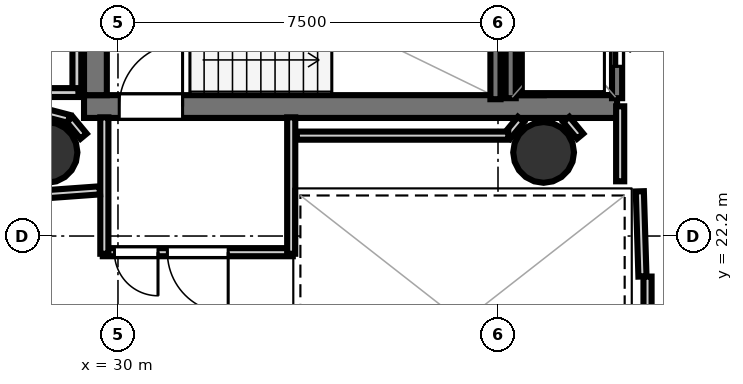
"""IFC4 building model, lengths in metres.
Left out: names, types, materials, properties, quantities, classifications, styles, units other than length and angle.
Written with IfcOpenShell. Run it as: python <this file> out.ifc"""

import sys

from ifc_helpers import new_model, si_unit, direction, frame, frame_2d, origin, origin_2d, place, context, subcontext, project, spatial, rectangle, hollow_circle, extrude, element, fill, save


model = new_model("IFC4")
c1 = context("Model", 3, precision=1e-05, world=origin(), true_north=direction((0.0, 1.0)))
c2 = subcontext(c1, "Body", "Model", "MODEL_VIEW")
j1 = project(units=[si_unit("LENGTHUNIT", "METRE"), si_unit("PLANEANGLEUNIT", "RADIAN")], contexts=[c1])
p1 = place(None, origin())
s1 = spatial("IfcSite", under=j1, at=p1, CompositionType="ELEMENT")
p2 = place(p1, origin())
s2 = spatial("IfcBuilding", under=s1, at=p2, CompositionType="ELEMENT")
p3 = place(p2, frame((0.0, 0.0, 211.4)))
s3 = spatial("IfcBuildingStorey", under=s2, at=p3, CompositionType="ELEMENT", Elevation=211.4)
p4 = place(p3, frame((29.33, 24.755, 0.0), z_axis=(0.0, 0.0, 1.0), x_axis=(1.0, 0.0, 0.0)))
e1 = element("IfcWall", 1, at=p4, inside=s3, PredefinedType="SHEAR", context=c2, shape_type="SweptSolid", body=[
    extrude(rectangle(XDim=10.52, YDim=0.45, at=frame_2d((5.26, 0.0))), origin(), (0.0, 0.0, 1.0), 3.52),
])
p5 = place(p4, frame((0.695, 0.0, 0.0)))
e2 = element("IfcOpeningElement", 2, at=p5, cuts=e1, PredefinedType="OPENING", context=c2, shape_type="SweptSolid", body=[
    extrude(rectangle(XDim=1.25, YDim=2.15, at=frame_2d((0.625, 1.075))), frame((0.0, 0.235, 0.0), z_axis=(0.0, -1.0, 0.0), x_axis=(1.0, 0.0, 0.0)), (0.0, 0.0, 1.0), 0.47),
])
for number, where, z_axis, x_axis in (
    (3, (29.555, 24.98, 0.0), (0.0, 0.0, 1.0), (0.0, 1.0, 0.0)),
    (4, (38.18, 24.98, 0.0), (0.0, 0.0, 1.0), (0.0, 1.0, 0.0)),
):
    element("IfcWall", number, at=place(p3, frame(where, z_axis=z_axis, x_axis=x_axis)), inside=s3, PredefinedType="SHEAR", context=c2, shape_type="SweptSolid", body=[
        extrude(rectangle(XDim=7.44, YDim=0.45, at=frame_2d((3.72, 0.0))), origin(), (0.0, 0.0, 1.0), 3.52),
    ])
for number, where, z_axis, x_axis in (
    (5, (28.6, 23.85, 0.0), (0.0, 0.0, 1.0), (1.0, 0.0, 0.0)),
    (6, (38.4, 23.85, 0.0), (0.0, 0.0, 1.0), (1.0, 0.0, 0.0)),
):
    element("IfcColumn", number, at=place(p3, frame(where, z_axis=z_axis, x_axis=x_axis)), inside=s3, PredefinedType="COLUMN", context=c2, shape_type="SweptSolid", body=[
        extrude(hollow_circle(Radius=0.6, WallThickness=0.03, at=origin_2d()), origin(), (0.0, 0.0, 1.0), 3.7),
    ])
p6 = place(p3, frame((37.45, 24.9, 0.0), z_axis=(0.0, 0.0, 1.0), x_axis=(0.0, 1.0, 0.0)))
e7 = element("IfcWall", 7, at=p6, inside=s3, PredefinedType="SOLIDWALL", context=c2, shape_type="SweptSolid", body=[
    extrude(rectangle(XDim=3.06, YDim=0.2, at=frame_2d((1.53, 0.0))), origin(), (0.0, 0.0, 1.0), 3.52),
])
p7 = place(p3, frame((39.85, 24.92, 0.0), z_axis=(0.0, 0.0, 1.0), x_axis=(0.0, 1.0, 0.0)))
e8 = element("IfcWall", 8, at=p7, inside=s3, PredefinedType="SOLIDWALL", context=c2, shape_type="SweptSolid", body=[
    extrude(rectangle(XDim=2.36, YDim=0.2, at=frame_2d((1.18, 0.0))), origin(), (0.0, 0.0, 1.0), 3.52),
])
p8 = place(p7, frame((0.63, 0.0, 0.0)))
e9 = element("IfcOpeningElement", 9, at=p8, cuts=e8, PredefinedType="OPENING", context=c2, shape_type="SweptSolid", body=[
    extrude(rectangle(XDim=1.1, YDim=2.15, at=frame_2d((0.55, 1.075))), frame((0.0, 0.11, 0.0), z_axis=(0.0, -1.0, 0.0), x_axis=(1.0, 0.0, 0.0)), (0.0, 0.0, 1.0), 0.22),
])
p9 = place(p3, frame((37.75, 24.92, 0.0), z_axis=(0.0, 0.0, 1.0), x_axis=(0.0, 1.0, 0.0)))
e10 = element("IfcWall", 10, at=p9, inside=s3, PredefinedType="SOLIDWALL", context=c2, shape_type="SweptSolid", body=[
    extrude(rectangle(XDim=2.36, YDim=0.2, at=frame_2d((1.18, 0.0))), origin(), (0.0, 0.0, 1.0), 3.52),
])
p10 = place(p3, frame((33.45, 21.881, 0.0), z_axis=(0.0, 0.0, 1.0), x_axis=(-1.0, 0.0, 0.0)))
e11 = element("IfcWall", 11, at=p10, inside=s3, PredefinedType="PARTITIONING", context=c2, shape_type="SweptSolid", body=[
    extrude(rectangle(XDim=3.75, YDim=0.16, at=frame_2d((1.875, 0.0))), origin(), (0.0, 0.0, 1.0), 2.84),
])
p11 = place(p10, frame((1.275, 0.0, 0.0)))
e12 = element("IfcOpeningElement", 12, at=p11, cuts=e11, PredefinedType="OPENING", context=c2, shape_type="SweptSolid", body=[
    extrude(rectangle(XDim=1.2, YDim=2.15, at=frame_2d((0.6, 1.075))), frame((0.0, 0.09, 0.0), z_axis=(0.0, -1.0, 0.0), x_axis=(1.0, 0.0, 0.0)), (0.0, 0.0, 1.0), 0.18),
])
p12 = place(p10, frame((2.66, 0.0, 0.0)))
e13 = element("IfcOpeningElement", 13, at=p12, cuts=e11, PredefinedType="OPENING", context=c2, shape_type="SweptSolid", body=[
    extrude(rectangle(XDim=0.86, YDim=2.05, at=frame_2d((0.43, 1.025))), frame((0.0, 0.09, 0.0), z_axis=(0.0, -1.0, 0.0), x_axis=(1.0, 0.0, 0.0)), (0.0, 0.0, 1.0), 0.18),
])
for number, where, z_axis, x_axis in (
    (14, (29.731, 21.85, 0.0), (0.0, 0.0, 1.0), (0.0, 1.0, 0.0)),
    (15, (33.419, 24.542, 0.0), (0.0, 0.0, 1.0), (0.0, -1.0, 0.0)),
):
    element("IfcWall", number, at=place(p3, frame(where, z_axis=z_axis, x_axis=x_axis)), inside=s3, PredefinedType="PARTITIONING", context=c2, shape_type="SweptSolid", body=[
        extrude(rectangle(XDim=2.692, YDim=0.16, at=frame_2d((1.346, 0.0))), origin(), (0.0, 0.0, 1.0), 2.84),
    ])
p13 = place(p3, frame((40.351, 21.401, 0.0), z_axis=(0.0, 0.0, 1.0), x_axis=(-0.031058045979, 0.999517582527, 0.0)))
e16 = element("IfcWall", 16, at=p13, inside=s3, PredefinedType="PARTITIONING", context=c2, shape_type="SweptSolid", body=[
    extrude(rectangle(XDim=1.682, YDim=0.16, at=frame_2d((0.841, 0.0))), origin(), (0.0, 0.0, 1.0), 2.84),
])
p14 = place(p3, frame((39.911, 23.28, 0.0), z_axis=(0.0, 0.0, 1.0), x_axis=(0.0, 1.0, 0.0)))
e17 = element("IfcWall", 17, at=p14, inside=s3, PredefinedType="PARTITIONING", context=c2, shape_type="SweptSolid", body=[
    extrude(rectangle(XDim=1.48, YDim=0.16, at=frame_2d((0.74, 0.0))), origin(), (0.0, 0.0, 1.0), 2.84),
])
p15 = place(p3, frame((40.451, 18.08, 0.0), z_axis=(0.0, 0.0, 1.0), x_axis=(0.0, 1.0, 0.0)))
e18 = element("IfcWall", 18, at=p15, inside=s3, PredefinedType="PARTITIONING", context=c2, shape_type="SweptSolid", body=[
    extrude(rectangle(XDim=3.32, YDim=0.16, at=frame_2d((1.66, 0.0))), origin(), (0.0, 0.0, 1.0), 2.84),
])
p16 = place(p3, frame((29.189, 28.32, 0.0), z_axis=(0.0, 0.0, 1.0), x_axis=(0.0, -1.0, 0.0)))
e19 = element("IfcWall", 19, at=p16, inside=s3, PredefinedType="PLUMBINGWALL", context=c2, shape_type="SweptSolid", body=[
    extrude(rectangle(XDim=3.32, YDim=0.175, at=frame_2d((1.66, 0.0))), origin(), (0.0, 0.0, 1.0), 2.84),
])
p17 = place(p3, frame((29.22, 25.031, 0.0), z_axis=(0.0, 0.0, 1.0), x_axis=(-1.0, 0.0, 0.0)))
e20 = element("IfcWall", 20, at=p17, inside=s3, PredefinedType="PLUMBINGWALL", context=c2, shape_type="SweptSolid", body=[
    extrude(rectangle(XDim=1.5, YDim=0.175, at=frame_2d((0.75, 0.0))), origin(), (0.0, 0.0, 1.0), 2.84),
])
p18 = place(p3, frame((29.321, 24.17, 0.0), z_axis=(0.0, 0.0, 1.0), x_axis=(-0.638008265708, 0.770029514296, 0.0)))
e21 = element("IfcWall", 21, at=p18, inside=s3, PredefinedType="PARTITIONING", context=c2, shape_type="SweptSolid", body=[
    extrude(rectangle(XDim=0.431, YDim=0.16, at=frame_2d((0.215, 0.0))), origin(), (0.0, 0.0, 1.0), 2.84),
])
p19 = place(p3, frame((29.03, 24.512, 0.0), z_axis=(0.0, 0.0, 1.0), x_axis=(-0.967681003213, 0.252177469296, 0.0)))
e22 = element("IfcWall", 22, at=p19, inside=s3, PredefinedType="PARTITIONING", context=c2, shape_type="SweptSolid", body=[
    extrude(rectangle(XDim=0.488, YDim=0.16, at=frame_2d((0.244, 0.0))), origin(), (0.0, 0.0, 1.0), 2.84),
])
for number, where, z_axis, x_axis in (
    (23, (39.121, 24.17, 0.0), (0.0, 0.0, 1.0), (-0.638, 0.77, 0.0)),
    (24, (37.954, 24.502, 0.0), (0.0, 0.0, 1.0), (-0.638, -0.77, 0.0)),
):
    element("IfcWall", number, at=place(p3, frame(where, z_axis=z_axis, x_axis=x_axis)), inside=s3, PredefinedType="PARTITIONING", context=c2, shape_type="SweptSolid", body=[
        extrude(rectangle(XDim=0.431, YDim=0.16, at=frame_2d((0.215, 0.0))), origin(), (0.0, 0.0, 1.0), 2.84),
    ])
p20 = place(p3, frame((37.703, 24.181, 0.0), z_axis=(0.0, 0.0, 1.0), x_axis=(-1.0, 0.0, 0.0)))
e25 = element("IfcWall", 25, at=p20, inside=s3, PredefinedType="PARTITIONING", context=c2, shape_type="SweptSolid", body=[
    extrude(rectangle(XDim=4.173, YDim=0.16, at=frame_2d((2.086, 0.0))), origin(), (0.0, 0.0, 1.0), 2.84),
])
p21 = place(p3, frame((28.442, 23.015, 0.0), z_axis=(0.0, 0.0, 1.0), x_axis=(0.99740683837, 0.07196942943, 0.0)))
e26 = element("IfcWall", 26, at=p21, inside=s3, PredefinedType="PARTITIONING", context=c2, shape_type="SweptSolid", body=[
    extrude(rectangle(XDim=1.201, YDim=0.16, at=frame_2d((0.601, 0.0))), origin(), (0.0, 0.0, 1.0), 2.84),
])
p22 = place(p5, origin())
e27 = element("IfcDoor", 27, at=p22, inside=s3, OperationType="SINGLE_SWING_RIGHT", PredefinedType="DOOR", context=c2, shape_type="SweptSolid", body=[
    extrude(rectangle(XDim=1.25, YDim=2.15, at=frame_2d((0.625, 1.075))), frame((0.0, 0.025, 0.0), z_axis=(0.0, -1.0, 0.0), x_axis=(1.0, 0.0, 0.0)), (0.0, 0.0, 1.0), 0.05),
])
fill(e2, e27)
p23 = place(p8, origin())
e28 = element("IfcDoor", 28, at=p23, inside=s3, OperationType="SLIDING_TO_LEFT", PredefinedType="DOOR", context=c2, shape_type="SweptSolid", body=[
    extrude(rectangle(XDim=1.1, YDim=2.15, at=frame_2d((0.55, 1.075))), frame((0.0, 0.025, 0.0), z_axis=(0.0, -1.0, 0.0), x_axis=(1.0, 0.0, 0.0)), (0.0, 0.0, 1.0), 0.05),
])
fill(e9, e28)
p24 = place(p11, origin())
e29 = element("IfcDoor", 29, at=p24, inside=s3, OperationType="SINGLE_SWING_LEFT", PredefinedType="DOOR", context=c2, shape_type="SweptSolid", body=[
    extrude(rectangle(XDim=1.2, YDim=2.15, at=frame_2d((0.6, 1.075))), frame((0.0, 0.025, 0.0), z_axis=(0.0, -1.0, 0.0), x_axis=(1.0, 0.0, 0.0)), (0.0, 0.0, 1.0), 0.05),
])
fill(e12, e29)
p25 = place(p12, origin())
e30 = element("IfcDoor", 30, at=p25, inside=s3, OperationType="SINGLE_SWING_LEFT", PredefinedType="DOOR", context=c2, shape_type="SweptSolid", body=[
    extrude(rectangle(XDim=0.86, YDim=2.05, at=frame_2d((0.43, 1.025))), frame((0.0, 0.025, 0.0), z_axis=(0.0, -1.0, 0.0), x_axis=(1.0, 0.0, 0.0)), (0.0, 0.0, 1.0), 0.05),
])
fill(e13, e30)
save(model, sys.argv[1])
